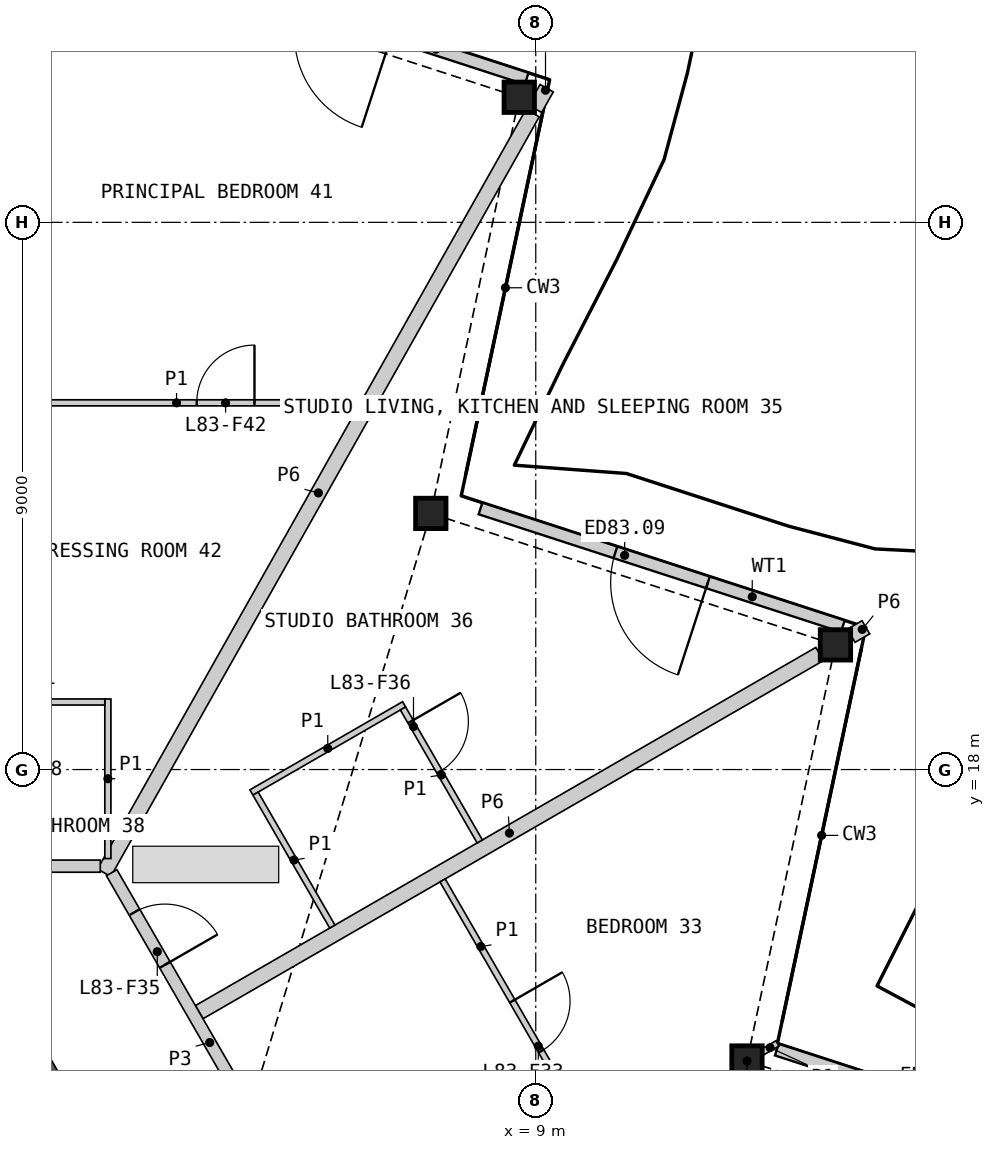
"""IFC4 building model, lengths in metres.
Left out: names, types, materials, properties, quantities, classifications, styles, units other than length and angle.
Written with IfcOpenShell. Run it as: python <this file> out.ifc"""

import sys

from ifc_helpers import new_model, si_unit, direction, frame, frame_2d, origin, origin_2d, place, context, subcontext, project, spatial, rectangle, hollow_rectangle, extrude, element, fill, save


model = new_model("IFC4")
c1 = context("Model", 3, precision=1e-05, world=origin(), true_north=direction((0.0, 1.0)))
c2 = subcontext(c1, "Body", "Model", "MODEL_VIEW")
j1 = project(units=[si_unit("LENGTHUNIT", "METRE"), si_unit("PLANEANGLEUNIT", "RADIAN")], contexts=[c1])
p1 = place(None, origin())
s1 = spatial("IfcSite", under=j1, at=p1, CompositionType="ELEMENT")
p2 = place(p1, origin())
s2 = spatial("IfcBuilding", under=s1, at=p2, CompositionType="ELEMENT")
p3 = place(p2, frame((0.0, 0.0, 371.2)))
s3 = spatial("IfcBuildingStorey", under=s2, at=p3, CompositionType="ELEMENT", Elevation=371.2)
for number, where, z_axis, x_axis in (
    (1, (12.474, 13.206, 0.0), (0.0, 0.0, 1.0), (1.0, 0.0, 0.0)),
    (2, (13.929, 20.051, 0.0), (0.0, 0.0, 1.0), (1.0, 0.0, 0.0)),
    (3, (7.274, 22.213, 0.0), (0.0, 0.0, 1.0), (1.0, 0.0, 0.0)),
    (4, (8.729, 29.057, 0.0), (0.0, 0.0, 1.0), (1.0, 0.0, 0.0)),
):
    element("IfcColumn", number, at=place(p3, frame(where, z_axis=z_axis, x_axis=x_axis)), inside=s3, PredefinedType="COLUMN", context=c2, shape_type="SweptSolid", body=[
        extrude(hollow_rectangle(XDim=0.5, YDim=0.5, WallThickness=0.03, at=origin_2d()), origin(), (0.0, 0.0, 1.0), 3.4),
    ])
p4 = place(p3, frame((19.25, 11.351, 0.0), z_axis=(0.0, 0.0, 1.0), x_axis=(-0.951060668786, 0.309004214029, 0.0)))
e5 = element("IfcWall", 5, at=p4, inside=s3, PredefinedType="SOLIDWALL", context=c2, shape_type="SweptSolid", body=[
    extrude(rectangle(XDim=6.609, YDim=0.2, at=frame_2d((3.305, 0.0))), origin(), (0.0, 0.0, 1.0), 2.634),
])
p5 = place(p4, frame((2.333, 0.0, 0.0)))
e6 = element("IfcOpeningElement", 6, at=p5, cuts=e5, PredefinedType="OPENING", context=c2, shape_type="SweptSolid", body=[
    extrude(rectangle(XDim=1.6, YDim=2.25, at=frame_2d((0.8, 1.125))), frame((0.0, 0.11, 0.0), z_axis=(0.0, -1.0, 0.0), x_axis=(1.0, 0.0, 0.0)), (0.0, 0.0, 1.0), 0.22),
])
p6 = place(p3, frame((14.05, 20.357, 0.0), z_axis=(0.0, 0.0, 1.0), x_axis=(-0.951060123915, 0.309005891041, 0.0)))
e7 = element("IfcWall", 7, at=p6, inside=s3, PredefinedType="SOLIDWALL", context=c2, shape_type="SweptSolid", body=[
    extrude(rectangle(XDim=6.265, YDim=0.2, at=frame_2d((3.133, 0.0))), origin(), (0.0, 0.0, 1.0), 2.634),
])
p7 = place(p6, frame((2.333, 0.0, 0.0)))
e8 = element("IfcOpeningElement", 8, at=p7, cuts=e7, PredefinedType="OPENING", context=c2, shape_type="SweptSolid", body=[
    extrude(rectangle(XDim=1.6, YDim=2.25, at=frame_2d((0.8, 1.125))), frame((0.0, 0.11, 0.0), z_axis=(0.0, -1.0, 0.0), x_axis=(1.0, 0.0, 0.0)), (0.0, 0.0, 1.0), 0.22),
])
p8 = place(p3, frame((8.85, 29.364, 0.0), z_axis=(0.0, 0.0, 1.0), x_axis=(-0.951048671744, 0.309041136379, 0.0)))
e9 = element("IfcWall", 9, at=p8, inside=s3, PredefinedType="SOLIDWALL", context=c2, shape_type="SweptSolid", body=[
    extrude(rectangle(XDim=6.265, YDim=0.2, at=frame_2d((3.133, 0.0))), origin(), (0.0, 0.0, 1.0), 2.634),
])
p9 = place(p8, frame((2.333, 0.0, 0.0)))
e10 = element("IfcOpeningElement", 10, at=p9, cuts=e9, PredefinedType="OPENING", context=c2, shape_type="SweptSolid", body=[
    extrude(rectangle(XDim=1.6, YDim=2.25, at=frame_2d((0.8, 1.125))), frame((0.0, 0.11, 0.0), z_axis=(0.0, -1.0, 0.0), x_axis=(1.0, 0.0, 0.0)), (0.0, 0.0, 1.0), 0.22),
])
p10 = place(p3, frame((8.686, -0.634, 0.0), z_axis=(0.0, 0.0, 1.0), x_axis=(-0.500004601921, 0.866022746848, 0.0)))
e11 = element("IfcWall", 11, at=p10, inside=s3, PredefinedType="SHEAR", context=c2, shape_type="SweptSolid", body=[
    extrude(rectangle(XDim=16.853, YDim=0.6, at=frame_2d((8.426, 0.0))), origin(), (0.0, 0.0, 1.0), 3.1),
])
p11 = place(p3, frame((1.902, 16.302, 0.0), z_axis=(0.0, 0.0, 1.0), x_axis=(0.491233789602, 0.871027763021, 0.0)))
e12 = element("IfcWall", 12, at=p11, inside=s3, PredefinedType="PARTITIONING", context=c2, shape_type="SweptSolid", body=[
    extrude(rectangle(XDim=14.345, YDim=0.25, at=frame_2d((7.173, 0.0))), origin(), (0.0, 0.0, 1.0), 2.33),
])
p12 = place(p3, frame((3.465, 14.01, 0.0), z_axis=(0.0, 0.0, 1.0), x_axis=(0.866032376801, 0.499987922186, 0.0)))
e13 = element("IfcWall", 13, at=p12, inside=s3, PredefinedType="PARTITIONING", context=c2, shape_type="SweptSolid", body=[
    extrude(rectangle(XDim=11.782, YDim=0.25, at=frame_2d((5.891, 0.0))), origin(), (0.0, 0.0, 1.0), 2.33),
])
p13 = place(p3, frame((2.025, 16.303, 0.0), z_axis=(0.0, 0.0, 1.0), x_axis=(0.500004215162, -0.866022970146, 0.0)))
e14 = element("IfcWall", 14, at=p13, inside=s3, PredefinedType="PARTITIONING", context=c2, shape_type="SweptSolid", body=[
    extrude(rectangle(XDim=4.3, YDim=0.2, at=frame_2d((2.15, 0.0))), origin(), (0.0, 0.0, 1.0), 3.1),
])
p14 = place(p13, frame((0.75, 0.0, 0.0)))
e15 = element("IfcOpeningElement", 15, at=p14, cuts=e14, PredefinedType="OPENING", context=c2, shape_type="SweptSolid", body=[
    extrude(rectangle(XDim=1.0, YDim=2.1, at=frame_2d((0.5, 1.05))), frame((0.0, 0.11, 0.0), z_axis=(0.0, -1.0, 0.0), x_axis=(1.0, 0.0, 0.0)), (0.0, 0.0, 1.0), 0.22),
])
p15 = place(p3, frame((-1.863, 16.411, 0.0), z_axis=(0.0, 0.0, 1.0), x_axis=(1.0, 0.0, 0.0)))
e16 = element("IfcWall", 16, at=p15, inside=s3, PredefinedType="PARTITIONING", context=c2, shape_type="SweptSolid", body=[
    extrude(rectangle(XDim=3.701, YDim=0.2, at=frame_2d((1.851, 0.0))), origin(), (0.0, 0.0, 1.0), 3.1),
])
p16 = place(p15, frame((0.25, 0.0, 0.0)))
e17 = element("IfcOpeningElement", 17, at=p16, cuts=e16, PredefinedType="OPENING", context=c2, shape_type="SweptSolid", body=[
    extrude(rectangle(XDim=1.0, YDim=2.1, at=frame_2d((0.5, 1.05))), frame((0.0, 0.11, 0.0), z_axis=(0.0, -1.0, 0.0), x_axis=(1.0, 0.0, 0.0)), (0.0, 0.0, 1.0), 0.22),
])
p17 = place(p3, frame((8.989, 28.868, 0.0), z_axis=(0.0, 0.0, 1.0), x_axis=(0.491394522511, 0.870937094885, 0.0)))
e18 = element("IfcWall", 18, at=p17, inside=s3, PredefinedType="PARTITIONING", context=c2, shape_type="SweptSolid", body=[
    extrude(rectangle(XDim=0.388, YDim=0.25, at=frame_2d((0.194, 0.0))), origin(), (0.0, 0.0, 1.0), 2.33),
])
p18 = place(p3, frame((14.189, 20.201, 0.0), z_axis=(0.0, 0.0, 1.0), x_axis=(0.865687176694, 0.50058536945, 0.0)))
e19 = element("IfcWall", 19, at=p18, inside=s3, PredefinedType="PARTITIONING", context=c2, shape_type="SweptSolid", body=[
    extrude(rectangle(XDim=0.278, YDim=0.25, at=frame_2d((0.139, 0.0))), origin(), (0.0, 0.0, 1.0), 2.33),
])
p19 = place(p3, frame((0.05, 24.031, 0.0), z_axis=(0.0, 0.0, 1.0), x_axis=(1.0, 0.0, 0.0)))
e20 = element("IfcWall", 20, at=p19, inside=s3, PredefinedType="PARTITIONING", context=c2, shape_type="SweptSolid", body=[
    extrude(rectangle(XDim=6.086, YDim=0.1, at=frame_2d((3.043, 0.0))), origin(), (0.0, 0.0, 1.0), 2.33),
])
p20 = place(p19, frame((3.374, 0.0, 0.0)))
e21 = element("IfcOpeningElement", 21, at=p20, cuts=e20, PredefinedType="OPENING", context=c2, shape_type="SweptSolid", body=[
    extrude(rectangle(XDim=0.95, YDim=2.1, at=frame_2d((0.475, 1.05))), frame((0.0, 0.06, 0.0), z_axis=(0.0, -1.0, 0.0), x_axis=(1.0, 0.0, 0.0)), (0.0, 0.0, 1.0), 0.12),
])
p21 = place(p3, frame((7.468, 16.176, 0.0), z_axis=(0.0, 0.0, 1.0), x_axis=(0.499990214365, -0.86603105345, 0.0)))
e22 = element("IfcWall", 22, at=p21, inside=s3, PredefinedType="PARTITIONING", context=c2, shape_type="SweptSolid", body=[
    extrude(rectangle(XDim=5.025, YDim=0.1, at=frame_2d((2.512, 0.0))), origin(), (0.0, 0.0, 1.0), 2.33),
])
p22 = place(p21, frame((2.293, 0.0, 0.0)))
e23 = element("IfcOpeningElement", 23, at=p22, cuts=e22, PredefinedType="OPENING", context=c2, shape_type="SweptSolid", body=[
    extrude(rectangle(XDim=0.95, YDim=2.1, at=frame_2d((0.475, 1.05))), frame((0.0, 0.06, 0.0), z_axis=(0.0, -1.0, 0.0), x_axis=(1.0, 0.0, 0.0)), (0.0, 0.0, 1.0), 0.12),
])
p23 = place(p3, frame((4.323, 17.623, 0.0), z_axis=(0.0, 0.0, 1.0), x_axis=(0.866032775405, 0.499987231761, 0.0)))
e24 = element("IfcWall", 24, at=p23, inside=s3, PredefinedType="PARTITIONING", context=c2, shape_type="SweptSolid", body=[
    extrude(rectangle(XDim=2.9, YDim=0.1, at=frame_2d((1.45, 0.0))), origin(), (0.0, 0.0, 1.0), 2.33),
])
p24 = place(p3, frame((1.963, 16.536, 0.0), z_axis=(0.0, 0.0, 1.0), x_axis=(0.0, 1.0, 0.0)))
e25 = element("IfcWall", 25, at=p24, inside=s3, PredefinedType="PARTITIONING", context=c2, shape_type="SweptSolid", body=[
    extrude(rectangle(XDim=2.625, YDim=0.1, at=frame_2d((1.312, 0.0))), origin(), (0.0, 0.0, 1.0), 2.33),
])
p25 = place(p3, frame((6.817, 19.004, 0.0), z_axis=(0.0, 0.0, 1.0), x_axis=(0.499976333282, -0.866039067339, 0.0)))
e26 = element("IfcWall", 26, at=p25, inside=s3, PredefinedType="PARTITIONING", context=c2, shape_type="SweptSolid", body=[
    extrude(rectangle(XDim=2.525, YDim=0.1, at=frame_2d((1.262, 0.0))), origin(), (0.0, 0.0, 1.0), 2.33),
])
p26 = place(p25, frame((0.25, 0.0, 0.0)))
e27 = element("IfcOpeningElement", 27, at=p26, cuts=e26, PredefinedType="OPENING", context=c2, shape_type="SweptSolid", body=[
    extrude(rectangle(XDim=0.95, YDim=2.1, at=frame_2d((0.475, 1.05))), frame((0.0, 0.06, 0.0), z_axis=(0.0, -1.0, 0.0), x_axis=(1.0, 0.0, 0.0)), (0.0, 0.0, 1.0), 0.12),
])
p27 = place(p3, frame((4.392, 17.604, 0.0), z_axis=(0.0, 0.0, 1.0), x_axis=(0.500048846702, -0.865997200291, 0.0)))
e28 = element("IfcWall", 28, at=p27, inside=s3, PredefinedType="PARTITIONING", context=c2, shape_type="SweptSolid", body=[
    extrude(rectangle(XDim=2.525, YDim=0.1, at=frame_2d((1.263, 0.0))), origin(), (0.0, 0.0, 1.0), 2.33),
])
p28 = place(p3, frame((-0.06, 19.111, 0.0), z_axis=(0.0, 0.0, 1.0), x_axis=(1.0, 0.0, 0.0)))
e29 = element("IfcWall", 29, at=p28, inside=s3, PredefinedType="PARTITIONING", context=c2, shape_type="SweptSolid", body=[
    extrude(rectangle(XDim=1.973, YDim=0.1, at=frame_2d((0.987, 0.0))), origin(), (0.0, 0.0, 1.0), 2.33),
])
p29 = place(p3, frame((12.734, 13.356, 0.0), z_axis=(0.0, 0.0, 1.0), x_axis=(0.865687176694, 0.50058536945, 0.0)))
e30 = element("IfcWall", 30, at=p29, inside=s3, PredefinedType="PARTITIONING", context=c2, shape_type="SweptSolid", body=[
    extrude(rectangle(XDim=0.278, YDim=0.1, at=frame_2d((0.139, 0.0))), origin(), (0.0, 0.0, 1.0), 2.33),
])
p30 = place(p7, origin())
e31 = element("IfcDoor", 31, at=p30, inside=s3, OperationType="DOUBLE_DOOR_SINGLE_SWING", PredefinedType="DOOR", context=c2, shape_type="SweptSolid", body=[
    extrude(rectangle(XDim=1.6, YDim=2.25, at=frame_2d((0.8, 1.125))), frame((0.0, 0.025, 0.0), z_axis=(0.0, -1.0, 0.0), x_axis=(1.0, 0.0, 0.0)), (0.0, 0.0, 1.0), 0.05),
])
fill(e8, e31)
p31 = place(p22, origin())
e32 = element("IfcDoor", 32, at=p31, inside=s3, OperationType="SINGLE_SWING_LEFT", PredefinedType="DOOR", context=c2, shape_type="SweptSolid", body=[
    extrude(rectangle(XDim=0.95, YDim=2.1, at=frame_2d((0.475, 1.05))), frame((0.0, 0.025, 0.0), z_axis=(0.0, -1.0, 0.0), x_axis=(1.0, 0.0, 0.0)), (0.0, 0.0, 1.0), 0.05),
])
fill(e23, e32)
p32 = place(p14, origin())
e33 = element("IfcDoor", 33, at=p32, inside=s3, OperationType="SINGLE_SWING_RIGHT", PredefinedType="DOOR", context=c2, shape_type="SweptSolid", body=[
    extrude(rectangle(XDim=1.0, YDim=2.1, at=frame_2d((0.5, 1.05))), frame((0.0, 0.025, 0.0), z_axis=(0.0, -1.0, 0.0), x_axis=(1.0, 0.0, 0.0)), (0.0, 0.0, 1.0), 0.05),
])
fill(e15, e33)
p33 = place(p26, origin())
e34 = element("IfcDoor", 34, at=p33, inside=s3, OperationType="SINGLE_SWING_LEFT", PredefinedType="DOOR", context=c2, shape_type="SweptSolid", body=[
    extrude(rectangle(XDim=0.95, YDim=2.1, at=frame_2d((0.475, 1.05))), frame((0.0, 0.025, 0.0), z_axis=(0.0, -1.0, 0.0), x_axis=(1.0, 0.0, 0.0)), (0.0, 0.0, 1.0), 0.05),
])
fill(e27, e34)
p34 = place(p20, origin())
e35 = element("IfcDoor", 35, at=p34, inside=s3, OperationType="SINGLE_SWING_RIGHT", PredefinedType="DOOR", context=c2, shape_type="SweptSolid", body=[
    extrude(rectangle(XDim=0.95, YDim=2.1, at=frame_2d((0.475, 1.05))), frame((0.0, 0.025, 0.0), z_axis=(0.0, -1.0, 0.0), x_axis=(1.0, 0.0, 0.0)), (0.0, 0.0, 1.0), 0.05),
])
fill(e21, e35)
save(model, sys.argv[1])
